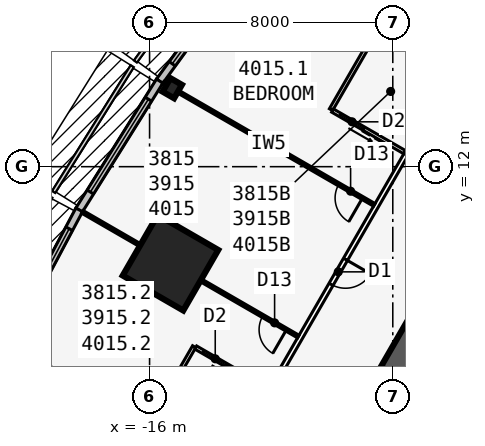
"""IFC4 building model, lengths in metres.
Left out: names, types, materials, properties, quantities, classifications, styles, units other than length and angle.
Written with IfcOpenShell. Run it as: python <this file> out.ifc"""

import sys

from ifc_helpers import new_model, si_unit, direction, frame, frame_2d, origin, origin_2d, place, context, subcontext, project, spatial, rectangle, i_section, extrude, element, fill, save


model = new_model("IFC4")
c1 = context("Model", 3, precision=1e-05, world=origin(), true_north=direction((0.0, 1.0)))
c2 = subcontext(c1, "Body", "Model", "MODEL_VIEW")
j1 = project(units=[si_unit("LENGTHUNIT", "METRE"), si_unit("PLANEANGLEUNIT", "RADIAN")], contexts=[c1])
p1 = place(None, origin())
s1 = spatial("IfcSite", under=j1, at=p1, CompositionType="ELEMENT")
p2 = place(p1, origin())
s2 = spatial("IfcBuilding", under=s1, at=p2, CompositionType="ELEMENT")
p3 = place(p2, frame((0.0, 0.0, 145.3)))
s3 = spatial("IfcBuildingStorey", under=s2, at=p3, CompositionType="ELEMENT", Elevation=145.3)
p4 = place(p3, frame((0.0, 19.052, 0.0), z_axis=(0.0, 0.0, 1.0), x_axis=(-0.499999749417, -0.866025548458, 0.0)))
e1 = element("IfcWall", 1, at=p4, inside=s3, PredefinedType="SHEAR", context=c2, shape_type="SweptSolid", body=[
    extrude(rectangle(XDim=33.0, YDim=0.9, at=frame_2d((16.5, 0.0))), origin(), (0.0, 0.0, 1.0), 3.4),
])
p5 = place(p4, frame((14.15, 0.0, 0.0)))
e2 = element("IfcOpeningElement", 2, at=p5, cuts=e1, PredefinedType="OPENING", context=c2, shape_type="SweptSolid", body=[
    extrude(rectangle(XDim=1.8, YDim=2.13, at=frame_2d((0.9, 1.065))), frame((0.0, 0.46, 0.0), z_axis=(0.0, -1.0, 0.0), x_axis=(1.0, 0.0, 0.0)), (0.0, 0.0, 1.0), 0.92),
])
p6 = place(p4, frame((12.6, 0.0, 0.0)))
e3 = element("IfcOpeningElement", 3, at=p6, cuts=e1, PredefinedType="OPENING", context=c2, shape_type="SweptSolid", body=[
    extrude(rectangle(XDim=1.0, YDim=2.13, at=frame_2d((0.5, 1.065))), frame((0.0, 0.46, 0.0), z_axis=(0.0, -1.0, 0.0), x_axis=(1.0, 0.0, 0.0)), (0.0, 0.0, 1.0), 0.92),
])
p7 = place(p3, frame((-15.254, 14.58, 0.0), z_axis=(0.0, 0.0, 1.0), x_axis=(-0.866025403784, 0.5, 0.0)))
e4 = element("IfcColumn", 4, at=p7, inside=s3, PredefinedType="COLUMN", context=c2, shape_type="SweptSolid", body=[
    extrude(i_section(OverallWidth=0.437, OverallDepth=0.513, WebThickness=0.061, FlangeThickness=0.097, at=origin_2d()), origin(), (0.0, 0.0, 1.0), 3.4),
])
p8 = place(p3, frame((-15.312, 8.84, 0.0), z_axis=(0.0, 0.0, 1.0), x_axis=(-0.866025403784, 0.5, 0.0)))
e5 = element("IfcColumn", 5, at=p8, inside=s3, PredefinedType="COLUMN", context=c2, shape_type="SweptSolid", body=[
    extrude(rectangle(XDim=2.3, YDim=2.3, at=origin_2d()), origin(), (0.0, 0.0, 1.0), 3.4),
])
p9 = place(p3, frame((-12.718, 18.875, 0.0), z_axis=(0.0, 0.0, 1.0), x_axis=(-0.587669188412, -0.809101307001, 0.0)))
e6 = element("IfcWall", 6, at=p9, inside=s3, PredefinedType="STANDARD", context=c2, shape_type="SweptSolid", body=[
    extrude(rectangle(XDim=5.028, YDim=0.25, at=frame_2d((2.514, 0.0))), origin(), (0.0, 0.0, 1.0), 3.235),
])
p10 = place(p9, frame((0.714, 0.0, 0.45)))
e7 = element("IfcOpeningElement", 7, at=p10, cuts=e6, PredefinedType="OPENING", context=c2, shape_type="SweptSolid", body=[
    extrude(rectangle(XDim=3.6, YDim=2.4, at=frame_2d((1.8, 1.2))), frame((0.0, 0.135, 0.0), z_axis=(0.0, -1.0, 0.0), x_axis=(1.0, 0.0, 0.0)), (0.0, 0.0, 1.0), 0.27),
])
p11 = place(p3, frame((-15.667, 14.814, 0.0), z_axis=(0.0, 0.0, 1.0), x_axis=(-0.529990167382, -0.84800378683, 0.0)))
e8 = element("IfcWall", 8, at=p11, inside=s3, PredefinedType="STANDARD", context=c2, shape_type="SweptSolid", body=[
    extrude(rectangle(XDim=5.003, YDim=0.25, at=frame_2d((2.501, 0.0))), origin(), (0.0, 0.0, 1.0), 3.235),
])
p12 = place(p11, frame((0.701, 0.0, 0.45)))
e9 = element("IfcOpeningElement", 9, at=p12, cuts=e8, PredefinedType="OPENING", context=c2, shape_type="SweptSolid", body=[
    extrude(rectangle(XDim=3.6, YDim=2.4, at=frame_2d((1.8, 1.2))), frame((0.0, 0.135, 0.0), z_axis=(0.0, -1.0, 0.0), x_axis=(1.0, 0.0, 0.0)), (0.0, 0.0, 1.0), 0.27),
])
p13 = place(p3, frame((-18.314, 10.579, 0.0), z_axis=(0.0, 0.0, 1.0), x_axis=(-0.469404966864, -0.882982999317, 0.0)))
e10 = element("IfcWall", 10, at=p13, inside=s3, PredefinedType="STANDARD", context=c2, shape_type="SweptSolid", body=[
    extrude(rectangle(XDim=5.003, YDim=0.25, at=frame_2d((2.501, 0.0))), origin(), (0.0, 0.0, 1.0), 3.235),
])
p14 = place(p13, frame((0.701, 0.0, 0.45)))
e11 = element("IfcOpeningElement", 11, at=p14, cuts=e10, PredefinedType="OPENING", context=c2, shape_type="SweptSolid", body=[
    extrude(rectangle(XDim=3.6, YDim=2.4, at=frame_2d((1.8, 1.2))), frame((0.0, 0.135, 0.0), z_axis=(0.0, -1.0, 0.0), x_axis=(1.0, 0.0, 0.0)), (0.0, 0.0, 1.0), 0.27),
])
p15 = place(p3, frame((-0.5, 24.636, 0.0), z_axis=(0.0, 0.0, 1.0), x_axis=(-0.500001915564, -0.86602429783, 0.0)))
e12 = element("IfcWall", 12, at=p15, inside=s3, PredefinedType="PARTITIONING", context=c2, shape_type="SweptSolid", body=[
    extrude(rectangle(XDim=42.172, YDim=0.15, at=frame_2d((21.086, 0.0))), origin(), (0.0, 0.0, 1.0), 3.235),
])
p16 = place(p15, frame((1.911, 0.0, 0.0)))
e13 = element("IfcOpeningElement", 13, at=p16, cuts=e12, PredefinedType="OPENING", context=c2, shape_type="SweptSolid", body=[
    extrude(rectangle(XDim=0.95, YDim=2.13, at=frame_2d((0.475, 1.065))), frame((0.0, 0.085, 0.0), z_axis=(0.0, -1.0, 0.0), x_axis=(1.0, 0.0, 0.0)), (0.0, 0.0, 1.0), 0.17),
])
p17 = place(p15, frame((9.311, 0.0, 0.0)))
e14 = element("IfcOpeningElement", 14, at=p17, cuts=e12, PredefinedType="OPENING", context=c2, shape_type="SweptSolid", body=[
    extrude(rectangle(XDim=0.95, YDim=2.13, at=frame_2d((0.475, 1.065))), frame((0.0, 0.085, 0.0), z_axis=(0.0, -1.0, 0.0), x_axis=(1.0, 0.0, 0.0)), (0.0, 0.0, 1.0), 0.17),
])
p18 = place(p15, frame((18.111, 0.0, 0.0)))
e15 = element("IfcOpeningElement", 15, at=p18, cuts=e12, PredefinedType="OPENING", context=c2, shape_type="SweptSolid", body=[
    extrude(rectangle(XDim=0.95, YDim=2.13, at=frame_2d((0.475, 1.065))), frame((0.0, 0.085, 0.0), z_axis=(0.0, -1.0, 0.0), x_axis=(1.0, 0.0, 0.0)), (0.0, 0.0, 1.0), 0.17),
])
p19 = place(p15, frame((29.311, 0.0, 0.0)))
e16 = element("IfcOpeningElement", 16, at=p19, cuts=e12, PredefinedType="OPENING", context=c2, shape_type="SweptSolid", body=[
    extrude(rectangle(XDim=0.95, YDim=2.13, at=frame_2d((0.475, 1.065))), frame((0.0, 0.085, 0.0), z_axis=(0.0, -1.0, 0.0), x_axis=(1.0, 0.0, 0.0)), (0.0, 0.0, 1.0), 0.17),
])
p20 = place(p15, frame((39.311, 0.0, 0.0)))
e17 = element("IfcOpeningElement", 17, at=p20, cuts=e12, PredefinedType="OPENING", context=c2, shape_type="SweptSolid", body=[
    extrude(rectangle(XDim=0.95, YDim=2.13, at=frame_2d((0.475, 1.065))), frame((0.0, 0.085, 0.0), z_axis=(0.0, -1.0, 0.0), x_axis=(1.0, 0.0, 0.0)), (0.0, 0.0, 1.0), 0.17),
])
p21 = place(p3, frame((-6.108, 15.073, 0.0), z_axis=(0.0, 0.0, 1.0), x_axis=(-0.866025567496, 0.499999716443, 0.0)))
e18 = element("IfcWall", 18, at=p21, inside=s3, PredefinedType="PARTITIONING", context=c2, shape_type="SweptSolid", body=[
    extrude(rectangle(XDim=7.495, YDim=0.15, at=frame_2d((3.748, 0.0))), origin(), (0.0, 0.0, 1.0), 2.389),
])
p22 = place(p3, frame((-8.608, 10.743, 0.0), z_axis=(0.0, 0.0, 1.0), x_axis=(-0.866041663918, 0.499971835565, 0.0)))
e19 = element("IfcWall", 19, at=p22, inside=s3, PredefinedType="PARTITIONING", context=c2, shape_type="SweptSolid", body=[
    extrude(rectangle(XDim=8.022, YDim=0.1, at=frame_2d((4.011, 0.0))), origin(), (0.0, 0.0, 1.0), 2.389),
])
p23 = place(p22, frame((0.45, 0.0, 0.0)))
e20 = element("IfcOpeningElement", 20, at=p23, cuts=e19, PredefinedType="OPENING", context=c2, shape_type="SweptSolid", body=[
    extrude(rectangle(XDim=0.9, YDim=2.13, at=frame_2d((0.45, 1.065))), frame((0.0, 0.06, 0.0), z_axis=(0.0, -1.0, 0.0), x_axis=(1.0, 0.0, 0.0)), (0.0, 0.0, 1.0), 0.12),
])
p24 = place(p3, frame((-11.108, 6.413, 0.0), z_axis=(0.0, 0.0, 1.0), x_axis=(-0.866026407964, 0.499998260706, 0.0)))
e21 = element("IfcWall", 21, at=p24, inside=s3, PredefinedType="PARTITIONING", context=c2, shape_type="SweptSolid", body=[
    extrude(rectangle(XDim=8.199, YDim=0.1, at=frame_2d((4.099, 0.0))), origin(), (0.0, 0.0, 1.0), 2.389),
])
p25 = place(p24, frame((0.45, 0.0, 0.0)))
e22 = element("IfcOpeningElement", 22, at=p25, cuts=e21, PredefinedType="OPENING", context=c2, shape_type="SweptSolid", body=[
    extrude(rectangle(XDim=0.9, YDim=2.13, at=frame_2d((0.45, 1.065))), frame((0.0, 0.06, 0.0), z_axis=(0.0, -1.0, 0.0), x_axis=(1.0, 0.0, 0.0)), (0.0, 0.0, 1.0), 0.12),
])
p26 = place(p3, frame((-13.608, 2.083, 0.0), z_axis=(0.0, 0.0, 1.0), x_axis=(-0.866028486751, 0.499994660107, 0.0)))
e23 = element("IfcWall", 23, at=p26, inside=s3, PredefinedType="PARTITIONING", context=c2, shape_type="SweptSolid", body=[
    extrude(rectangle(XDim=8.022, YDim=0.15, at=frame_2d((4.011, 0.0))), origin(), (0.0, 0.0, 1.0), 2.389),
])
p27 = place(p3, frame((-8.533, 16.473, 0.0), z_axis=(0.0, 0.0, 1.0), x_axis=(-0.499990139034, -0.866031096941, 0.0)))
e24 = element("IfcWall", 24, at=p27, inside=s3, PredefinedType="PLUMBINGWALL", context=c2, shape_type="SweptSolid", body=[
    extrude(rectangle(XDim=3.0, YDim=0.12, at=frame_2d((1.5, 0.0))), origin(), (0.0, 0.0, 1.0), 3.235),
])
p28 = place(p3, frame((-7.608, 12.475, 0.0), z_axis=(0.0, 0.0, 1.0), x_axis=(-0.866035715982, 0.499982138324, 0.0)))
e25 = element("IfcWall", 25, at=p28, inside=s3, PredefinedType="PLUMBINGWALL", context=c2, shape_type="SweptSolid", body=[
    extrude(rectangle(XDim=2.74, YDim=0.12, at=frame_2d((1.37, 0.0))), origin(), (0.0, 0.0, 1.0), 3.235),
])
p29 = place(p28, frame((1.55, 0.0, 0.0)))
e26 = element("IfcOpeningElement", 26, at=p29, cuts=e25, PredefinedType="OPENING", context=c2, shape_type="SweptSolid", body=[
    extrude(rectangle(XDim=0.9, YDim=2.13, at=frame_2d((0.45, 1.065))), frame((0.0, 0.07, 0.0), z_axis=(0.0, -1.0, 0.0), x_axis=(1.0, 0.0, 0.0)), (0.0, 0.0, 1.0), 0.14),
])
p30 = place(p3, frame((-14.533, 6.081, 0.0), z_axis=(0.0, 0.0, 1.0), x_axis=(-0.499990139034, -0.866031096941, 0.0)))
e27 = element("IfcWall", 27, at=p30, inside=s3, PredefinedType="PLUMBINGWALL", context=c2, shape_type="SweptSolid", body=[
    extrude(rectangle(XDim=3.0, YDim=0.12, at=frame_2d((1.5, 0.0))), origin(), (0.0, 0.0, 1.0), 3.235),
])
p31 = place(p3, frame((-12.108, 4.681, 0.0), z_axis=(0.0, 0.0, 1.0), x_axis=(-0.866035715982, 0.499982138324, 0.0)))
e28 = element("IfcWall", 28, at=p31, inside=s3, PredefinedType="PLUMBINGWALL", context=c2, shape_type="SweptSolid", body=[
    extrude(rectangle(XDim=2.74, YDim=0.12, at=frame_2d((1.37, 0.0))), origin(), (0.0, 0.0, 1.0), 3.235),
])
p32 = place(p31, frame((1.55, 0.0, 0.0)))
e29 = element("IfcOpeningElement", 29, at=p32, cuts=e28, PredefinedType="OPENING", context=c2, shape_type="SweptSolid", body=[
    extrude(rectangle(XDim=0.9, YDim=2.13, at=frame_2d((0.45, 1.065))), frame((0.0, 0.07, 0.0), z_axis=(0.0, -1.0, 0.0), x_axis=(1.0, 0.0, 0.0)), (0.0, 0.0, 1.0), 0.14),
])
p33 = place(p10, origin())
e30 = element("IfcWindow", 30, at=p33, inside=s3, PartitioningType="SINGLE_PANEL", PredefinedType="WINDOW", context=c2, shape_type="SweptSolid", body=[
    extrude(rectangle(XDim=3.6, YDim=2.4, at=frame_2d((1.8, 1.2))), frame((0.0, 0.03, 0.0), z_axis=(0.0, -1.0, 0.0), x_axis=(1.0, 0.0, 0.0)), (0.0, 0.0, 1.0), 0.06),
])
fill(e7, e30)
p34 = place(p12, origin())
e31 = element("IfcWindow", 31, at=p34, inside=s3, PartitioningType="SINGLE_PANEL", PredefinedType="WINDOW", context=c2, shape_type="SweptSolid", body=[
    extrude(rectangle(XDim=3.6, YDim=2.4, at=frame_2d((1.8, 1.2))), frame((0.0, 0.03, 0.0), z_axis=(0.0, -1.0, 0.0), x_axis=(1.0, 0.0, 0.0)), (0.0, 0.0, 1.0), 0.06),
])
fill(e9, e31)
p35 = place(p14, origin())
e32 = element("IfcWindow", 32, at=p35, inside=s3, PartitioningType="SINGLE_PANEL", PredefinedType="WINDOW", context=c2, shape_type="SweptSolid", body=[
    extrude(rectangle(XDim=3.6, YDim=2.4, at=frame_2d((1.8, 1.2))), frame((0.0, 0.03, 0.0), z_axis=(0.0, -1.0, 0.0), x_axis=(1.0, 0.0, 0.0)), (0.0, 0.0, 1.0), 0.06),
])
fill(e11, e32)
p36 = place(p23, origin())
e33 = element("IfcDoor", 33, at=p36, inside=s3, OperationType="SINGLE_SWING_LEFT", PredefinedType="DOOR", context=c2, shape_type="SweptSolid", body=[
    extrude(rectangle(XDim=0.9, YDim=2.13, at=frame_2d((0.45, 1.065))), frame((0.0, 0.025, 0.0), z_axis=(0.0, -1.0, 0.0), x_axis=(1.0, 0.0, 0.0)), (0.0, 0.0, 1.0), 0.05),
])
fill(e20, e33)
p37 = place(p25, origin())
e34 = element("IfcDoor", 34, at=p37, inside=s3, OperationType="SINGLE_SWING_LEFT", PredefinedType="DOOR", context=c2, shape_type="SweptSolid", body=[
    extrude(rectangle(XDim=0.9, YDim=2.13, at=frame_2d((0.45, 1.065))), frame((0.0, 0.025, 0.0), z_axis=(0.0, -1.0, 0.0), x_axis=(1.0, 0.0, 0.0)), (0.0, 0.0, 1.0), 0.05),
])
fill(e22, e34)
p38 = place(p29, origin())
e35 = element("IfcDoor", 35, at=p38, inside=s3, OperationType="SLIDING_TO_LEFT", PredefinedType="DOOR", context=c2, shape_type="SweptSolid", body=[
    extrude(rectangle(XDim=0.9, YDim=2.13, at=frame_2d((0.45, 1.065))), frame((0.0, 0.025, 0.0), z_axis=(0.0, -1.0, 0.0), x_axis=(1.0, 0.0, 0.0)), (0.0, 0.0, 1.0), 0.05),
])
fill(e26, e35)
p39 = place(p18, origin())
e36 = element("IfcDoor", 36, at=p39, inside=s3, OperationType="SINGLE_SWING_LEFT", PredefinedType="DOOR", context=c2, shape_type="SweptSolid", body=[
    extrude(rectangle(XDim=0.95, YDim=2.13, at=frame_2d((0.475, 1.065))), frame((0.0, 0.025, 0.0), z_axis=(0.0, -1.0, 0.0), x_axis=(1.0, 0.0, 0.0)), (0.0, 0.0, 1.0), 0.05),
])
fill(e15, e36)
p40 = place(p32, origin())
e37 = element("IfcDoor", 37, at=p40, inside=s3, OperationType="SLIDING_TO_LEFT", PredefinedType="DOOR", context=c2, shape_type="SweptSolid", body=[
    extrude(rectangle(XDim=0.9, YDim=2.13, at=frame_2d((0.45, 1.065))), frame((0.0, 0.025, 0.0), z_axis=(0.0, -1.0, 0.0), x_axis=(1.0, 0.0, 0.0)), (0.0, 0.0, 1.0), 0.05),
])
fill(e29, e37)
p41 = place(p5, origin())
e38 = element("IfcDoor", 38, at=p41, inside=s3, OperationType="DOUBLE_DOOR_SINGLE_SWING", PredefinedType="DOOR", context=c2, shape_type="SweptSolid", body=[
    extrude(rectangle(XDim=1.8, YDim=2.13, at=frame_2d((0.9, 1.065))), frame((0.0, 0.025, 0.0), z_axis=(0.0, -1.0, 0.0), x_axis=(1.0, 0.0, 0.0)), (0.0, 0.0, 1.0), 0.05),
])
fill(e2, e38)
save(model, sys.argv[1])
